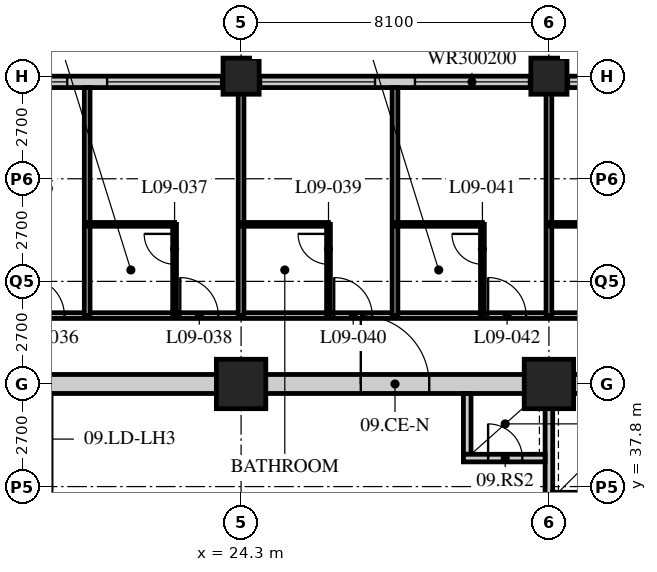
"""IFC4 building model, lengths in metres.
Left out: names, types, materials, properties, quantities, classifications, styles, units other than length and angle.
Written with IfcOpenShell. Run it as: python <this file> out.ifc"""

import sys

from ifc_helpers import new_model, si_unit, direction, frame, frame_2d, origin, origin_2d, place, context, subcontext, project, spatial, rectangle, hollow_rectangle, extrude, element, fill, save


model = new_model("IFC4")
c1 = context("Model", 3, precision=1e-05, world=origin(), true_north=direction((0.0, 1.0)))
c2 = subcontext(c1, "Body", "Model", "MODEL_VIEW")
j1 = project(units=[si_unit("LENGTHUNIT", "METRE"), si_unit("PLANEANGLEUNIT", "RADIAN")], contexts=[c1])
p1 = place(None, origin())
s1 = spatial("IfcSite", under=j1, at=p1, CompositionType="ELEMENT")
p2 = place(p1, origin())
s2 = spatial("IfcBuilding", under=s1, at=p2, CompositionType="ELEMENT")
p3 = place(p2, frame((0.0, 0.0, 43.2)))
s3 = spatial("IfcBuildingStorey", under=s2, at=p3, CompositionType="ELEMENT", Elevation=43.2)
p4 = place(p3, frame((24.3, 40.5, 0.0), z_axis=(0.0, 0.0, 1.0), x_axis=(1.0, 0.0, 0.0)))
e1 = element("IfcColumn", 1, at=p4, inside=s3, PredefinedType="COLUMN", context=c2, shape_type="SweptSolid", body=[
    extrude(hollow_rectangle(XDim=1.3, YDim=1.3, WallThickness=0.13, at=origin_2d()), origin(), (0.0, 0.0, 1.0), 3.4),
])
p5 = place(p3, frame((24.3, 48.6, 0.0), z_axis=(0.0, 0.0, 1.0), x_axis=(1.0, 0.0, 0.0)))
e2 = element("IfcColumn", 2, at=p5, inside=s3, PredefinedType="COLUMN", context=c2, shape_type="SweptSolid", body=[
    extrude(hollow_rectangle(XDim=0.95, YDim=0.95, WallThickness=0.095, at=origin_2d()), origin(), (0.0, 0.0, 1.0), 3.4),
])
p6 = place(p3, frame((32.4, 40.5, 0.0), z_axis=(0.0, 0.0, 1.0), x_axis=(1.0, 0.0, 0.0)))
e3 = element("IfcColumn", 3, at=p6, inside=s3, PredefinedType="COLUMN", context=c2, shape_type="SweptSolid", body=[
    extrude(hollow_rectangle(XDim=1.3, YDim=1.3, WallThickness=0.13, at=origin_2d()), origin(), (0.0, 0.0, 1.0), 3.4),
])
p7 = place(p3, frame((32.4, 48.6, 0.0), z_axis=(0.0, 0.0, 1.0), x_axis=(1.0, 0.0, 0.0)))
e4 = element("IfcColumn", 4, at=p7, inside=s3, PredefinedType="COLUMN", context=c2, shape_type="SweptSolid", body=[
    extrude(hollow_rectangle(XDim=0.95, YDim=0.95, WallThickness=0.095, at=origin_2d()), origin(), (0.0, 0.0, 1.0), 3.4),
])
p8 = place(p3, frame((48.3, 48.45, 0.0), z_axis=(0.0, 0.0, 1.0), x_axis=(-1.0, 0.0, 0.0)))
e5 = element("IfcWall", 5, at=p8, inside=s3, PredefinedType="SOLIDWALL", context=c2, shape_type="SweptSolid", body=[
    extrude(rectangle(XDim=40.2, YDim=0.3, at=frame_2d((20.1, 0.0))), origin(), (0.0, 0.0, 1.0), 3.19),
])
p9 = place(p8, frame((0.225, 0.0, 0.9)))
e6 = element("IfcOpeningElement", 6, at=p9, cuts=e5, PredefinedType="OPENING", context=c2, shape_type="SweptSolid", body=[
    extrude(rectangle(XDim=3.0, YDim=2.0, at=frame_2d((1.5, 1.0))), frame((0.0, 0.16, 0.0), z_axis=(0.0, -1.0, 0.0), x_axis=(1.0, 0.0, 0.0)), (0.0, 0.0, 1.0), 0.32),
])
p10 = place(p8, frame((4.275, 0.0, 0.9)))
e7 = element("IfcOpeningElement", 7, at=p10, cuts=e5, PredefinedType="OPENING", context=c2, shape_type="SweptSolid", body=[
    extrude(rectangle(XDim=3.0, YDim=2.0, at=frame_2d((1.5, 1.0))), frame((0.0, 0.16, 0.0), z_axis=(0.0, -1.0, 0.0), x_axis=(1.0, 0.0, 0.0)), (0.0, 0.0, 1.0), 0.32),
])
p11 = place(p8, frame((8.325, 0.0, 0.9)))
e8 = element("IfcOpeningElement", 8, at=p11, cuts=e5, PredefinedType="OPENING", context=c2, shape_type="SweptSolid", body=[
    extrude(rectangle(XDim=3.0, YDim=2.0, at=frame_2d((1.5, 1.0))), frame((0.0, 0.16, 0.0), z_axis=(0.0, -1.0, 0.0), x_axis=(1.0, 0.0, 0.0)), (0.0, 0.0, 1.0), 0.32),
])
p12 = place(p8, frame((12.375, 0.0, 0.9)))
e9 = element("IfcOpeningElement", 9, at=p12, cuts=e5, PredefinedType="OPENING", context=c2, shape_type="SweptSolid", body=[
    extrude(rectangle(XDim=3.0, YDim=2.0, at=frame_2d((1.5, 1.0))), frame((0.0, 0.16, 0.0), z_axis=(0.0, -1.0, 0.0), x_axis=(1.0, 0.0, 0.0)), (0.0, 0.0, 1.0), 0.32),
])
p13 = place(p8, frame((16.425, 0.0, 0.9)))
e10 = element("IfcOpeningElement", 10, at=p13, cuts=e5, PredefinedType="OPENING", context=c2, shape_type="SweptSolid", body=[
    extrude(rectangle(XDim=3.0, YDim=2.0, at=frame_2d((1.5, 1.0))), frame((0.0, 0.16, 0.0), z_axis=(0.0, -1.0, 0.0), x_axis=(1.0, 0.0, 0.0)), (0.0, 0.0, 1.0), 0.32),
])
p14 = place(p8, frame((20.475, 0.0, 0.9)))
e11 = element("IfcOpeningElement", 11, at=p14, cuts=e5, PredefinedType="OPENING", context=c2, shape_type="SweptSolid", body=[
    extrude(rectangle(XDim=3.0, YDim=2.0, at=frame_2d((1.5, 1.0))), frame((0.0, 0.16, 0.0), z_axis=(0.0, -1.0, 0.0), x_axis=(1.0, 0.0, 0.0)), (0.0, 0.0, 1.0), 0.32),
])
p15 = place(p8, frame((24.525, 0.0, 0.9)))
e12 = element("IfcOpeningElement", 12, at=p15, cuts=e5, PredefinedType="OPENING", context=c2, shape_type="SweptSolid", body=[
    extrude(rectangle(XDim=3.0, YDim=2.0, at=frame_2d((1.5, 1.0))), frame((0.0, 0.16, 0.0), z_axis=(0.0, -1.0, 0.0), x_axis=(1.0, 0.0, 0.0)), (0.0, 0.0, 1.0), 0.32),
])
p16 = place(p8, frame((28.575, 0.0, 0.9)))
e13 = element("IfcOpeningElement", 13, at=p16, cuts=e5, PredefinedType="OPENING", context=c2, shape_type="SweptSolid", body=[
    extrude(rectangle(XDim=3.0, YDim=2.0, at=frame_2d((1.5, 1.0))), frame((0.0, 0.16, 0.0), z_axis=(0.0, -1.0, 0.0), x_axis=(1.0, 0.0, 0.0)), (0.0, 0.0, 1.0), 0.32),
])
p17 = place(p8, frame((32.625, 0.0, 0.9)))
e14 = element("IfcOpeningElement", 14, at=p17, cuts=e5, PredefinedType="OPENING", context=c2, shape_type="SweptSolid", body=[
    extrude(rectangle(XDim=3.0, YDim=2.0, at=frame_2d((1.5, 1.0))), frame((0.0, 0.16, 0.0), z_axis=(0.0, -1.0, 0.0), x_axis=(1.0, 0.0, 0.0)), (0.0, 0.0, 1.0), 0.32),
])
p18 = place(p8, frame((36.675, 0.0, 0.9)))
e15 = element("IfcOpeningElement", 15, at=p18, cuts=e5, PredefinedType="OPENING", context=c2, shape_type="SweptSolid", body=[
    extrude(rectangle(XDim=3.0, YDim=2.0, at=frame_2d((1.5, 1.0))), frame((0.0, 0.16, 0.0), z_axis=(0.0, -1.0, 0.0), x_axis=(1.0, 0.0, 0.0)), (0.0, 0.0, 1.0), 0.32),
])
p19 = place(p3, frame((8.1, 42.3, 0.0), z_axis=(0.0, 0.0, 1.0), x_axis=(1.0, 0.0, 0.0)))
e16 = element("IfcWall", 16, at=p19, inside=s3, PredefinedType="PARTITIONING", context=c2, shape_type="SweptSolid", body=[
    extrude(rectangle(XDim=40.5, YDim=0.15, at=frame_2d((20.25, 0.0))), origin(), (0.0, 0.0, 1.0), 3.19),
])
p20 = place(p19, frame((6.5, 0.0, 0.0)))
e17 = element("IfcOpeningElement", 17, at=p20, cuts=e16, PredefinedType="OPENING", context=c2, shape_type="SweptSolid", body=[
    extrude(rectangle(XDim=1.0, YDim=2.1, at=frame_2d((0.5, 1.05))), frame((0.0, 0.085, 0.0), z_axis=(0.0, -1.0, 0.0), x_axis=(1.0, 0.0, 0.0)), (0.0, 0.0, 1.0), 0.17),
])
p21 = place(p19, frame((10.55, 0.0, 0.0)))
e18 = element("IfcOpeningElement", 18, at=p21, cuts=e16, PredefinedType="OPENING", context=c2, shape_type="SweptSolid", body=[
    extrude(rectangle(XDim=1.0, YDim=2.1, at=frame_2d((0.5, 1.05))), frame((0.0, 0.085, 0.0), z_axis=(0.0, -1.0, 0.0), x_axis=(1.0, 0.0, 0.0)), (0.0, 0.0, 1.0), 0.17),
])
p22 = place(p19, frame((14.6, 0.0, 0.0)))
e19 = element("IfcOpeningElement", 19, at=p22, cuts=e16, PredefinedType="OPENING", context=c2, shape_type="SweptSolid", body=[
    extrude(rectangle(XDim=1.0, YDim=2.1, at=frame_2d((0.5, 1.05))), frame((0.0, 0.085, 0.0), z_axis=(0.0, -1.0, 0.0), x_axis=(1.0, 0.0, 0.0)), (0.0, 0.0, 1.0), 0.17),
])
p23 = place(p19, frame((18.65, 0.0, 0.0)))
e20 = element("IfcOpeningElement", 20, at=p23, cuts=e16, PredefinedType="OPENING", context=c2, shape_type="SweptSolid", body=[
    extrude(rectangle(XDim=1.0, YDim=2.1, at=frame_2d((0.5, 1.05))), frame((0.0, 0.085, 0.0), z_axis=(0.0, -1.0, 0.0), x_axis=(1.0, 0.0, 0.0)), (0.0, 0.0, 1.0), 0.17),
])
p24 = place(p19, frame((22.7, 0.0, 0.0)))
e21 = element("IfcOpeningElement", 21, at=p24, cuts=e16, PredefinedType="OPENING", context=c2, shape_type="SweptSolid", body=[
    extrude(rectangle(XDim=1.0, YDim=2.1, at=frame_2d((0.5, 1.05))), frame((0.0, 0.085, 0.0), z_axis=(0.0, -1.0, 0.0), x_axis=(1.0, 0.0, 0.0)), (0.0, 0.0, 1.0), 0.17),
])
p25 = place(p19, frame((26.75, 0.0, 0.0)))
e22 = element("IfcOpeningElement", 22, at=p25, cuts=e16, PredefinedType="OPENING", context=c2, shape_type="SweptSolid", body=[
    extrude(rectangle(XDim=1.0, YDim=2.1, at=frame_2d((0.5, 1.05))), frame((0.0, 0.085, 0.0), z_axis=(0.0, -1.0, 0.0), x_axis=(1.0, 0.0, 0.0)), (0.0, 0.0, 1.0), 0.17),
])
p26 = place(p19, frame((30.8, 0.0, 0.0)))
e23 = element("IfcOpeningElement", 23, at=p26, cuts=e16, PredefinedType="OPENING", context=c2, shape_type="SweptSolid", body=[
    extrude(rectangle(XDim=1.0, YDim=2.1, at=frame_2d((0.5, 1.05))), frame((0.0, 0.085, 0.0), z_axis=(0.0, -1.0, 0.0), x_axis=(1.0, 0.0, 0.0)), (0.0, 0.0, 1.0), 0.17),
])
p27 = place(p19, frame((34.85, 0.0, 0.0)))
e24 = element("IfcOpeningElement", 24, at=p27, cuts=e16, PredefinedType="OPENING", context=c2, shape_type="SweptSolid", body=[
    extrude(rectangle(XDim=1.0, YDim=2.1, at=frame_2d((0.5, 1.05))), frame((0.0, 0.085, 0.0), z_axis=(0.0, -1.0, 0.0), x_axis=(1.0, 0.0, 0.0)), (0.0, 0.0, 1.0), 0.17),
])
p28 = place(p19, frame((36.875, 0.0, 0.0)))
e25 = element("IfcOpeningElement", 25, at=p28, cuts=e16, PredefinedType="OPENING", context=c2, shape_type="SweptSolid", body=[
    extrude(rectangle(XDim=1.0, YDim=2.1, at=frame_2d((0.5, 1.05))), frame((0.0, 0.085, 0.0), z_axis=(0.0, -1.0, 0.0), x_axis=(1.0, 0.0, 0.0)), (0.0, 0.0, 1.0), 0.17),
])
p29 = place(p19, frame((2.625, 0.0, 0.0)))
e26 = element("IfcOpeningElement", 26, at=p29, cuts=e16, PredefinedType="OPENING", context=c2, shape_type="SweptSolid", body=[
    extrude(rectangle(XDim=1.0, YDim=2.1, at=frame_2d((0.5, 1.05))), frame((0.0, 0.085, 0.0), z_axis=(0.0, -1.0, 0.0), x_axis=(1.0, 0.0, 0.0)), (0.0, 0.0, 1.0), 0.17),
])
p30 = place(p3, frame((20.25, 42.3, 0.0), z_axis=(0.0, 0.0, 1.0), x_axis=(0.0, 1.0, 0.0)))
e27 = element("IfcWall", 27, at=p30, inside=s3, PredefinedType="PARTITIONING", context=c2, shape_type="SweptSolid", body=[
    extrude(rectangle(XDim=6.0, YDim=0.15, at=frame_2d((3.0, 0.0))), origin(), (0.0, 0.0, 1.0), 3.19),
])
p31 = place(p3, frame((20.25, 44.7, 0.0), z_axis=(0.0, 0.0, 1.0), x_axis=(1.0, 0.0, 0.0)))
e28 = element("IfcWall", 28, at=p31, inside=s3, PredefinedType="PARTITIONING", context=c2, shape_type="SweptSolid", body=[
    extrude(rectangle(XDim=2.3, YDim=0.1, at=frame_2d((1.15, 0.0))), origin(), (0.0, 0.0, 1.0), 3.19),
])
p32 = place(p3, frame((22.55, 42.3, 0.0), z_axis=(0.0, 0.0, 1.0), x_axis=(0.0, 1.0, 0.0)))
e29 = element("IfcWall", 29, at=p32, inside=s3, PredefinedType="PARTITIONING", context=c2, shape_type="SweptSolid", body=[
    extrude(rectangle(XDim=2.4, YDim=0.1, at=frame_2d((1.2, 0.0))), origin(), (0.0, 0.0, 1.0), 3.19),
])
p33 = place(p32, frame((1.35, 0.0, 0.0)))
e30 = element("IfcOpeningElement", 30, at=p33, cuts=e29, PredefinedType="OPENING", context=c2, shape_type="SweptSolid", body=[
    extrude(rectangle(XDim=0.8, YDim=2.1, at=frame_2d((0.4, 1.05))), frame((0.0, 0.06, 0.0), z_axis=(0.0, -1.0, 0.0), x_axis=(1.0, 0.0, 0.0)), (0.0, 0.0, 1.0), 0.12),
])
p34 = place(p3, frame((24.3, 42.3, 0.0), z_axis=(0.0, 0.0, 1.0), x_axis=(0.0, 1.0, 0.0)))
e31 = element("IfcWall", 31, at=p34, inside=s3, PredefinedType="PARTITIONING", context=c2, shape_type="SweptSolid", body=[
    extrude(rectangle(XDim=6.0, YDim=0.15, at=frame_2d((3.0, 0.0))), origin(), (0.0, 0.0, 1.0), 2.578),
])
p35 = place(p3, frame((24.3, 44.7, 0.0), z_axis=(0.0, 0.0, 1.0), x_axis=(1.0, 0.0, 0.0)))
e32 = element("IfcWall", 32, at=p35, inside=s3, PredefinedType="PARTITIONING", context=c2, shape_type="SweptSolid", body=[
    extrude(rectangle(XDim=2.3, YDim=0.1, at=frame_2d((1.15, 0.0))), origin(), (0.0, 0.0, 1.0), 3.19),
])
p36 = place(p3, frame((26.6, 42.3, 0.0), z_axis=(0.0, 0.0, 1.0), x_axis=(0.0, 1.0, 0.0)))
e33 = element("IfcWall", 33, at=p36, inside=s3, PredefinedType="PARTITIONING", context=c2, shape_type="SweptSolid", body=[
    extrude(rectangle(XDim=2.4, YDim=0.1, at=frame_2d((1.2, 0.0))), origin(), (0.0, 0.0, 1.0), 3.19),
])
p37 = place(p36, frame((1.35, 0.0, 0.0)))
e34 = element("IfcOpeningElement", 34, at=p37, cuts=e33, PredefinedType="OPENING", context=c2, shape_type="SweptSolid", body=[
    extrude(rectangle(XDim=0.8, YDim=2.1, at=frame_2d((0.4, 1.05))), frame((0.0, 0.06, 0.0), z_axis=(0.0, -1.0, 0.0), x_axis=(1.0, 0.0, 0.0)), (0.0, 0.0, 1.0), 0.12),
])
p38 = place(p3, frame((28.35, 42.3, 0.0), z_axis=(0.0, 0.0, 1.0), x_axis=(0.0, 1.0, 0.0)))
e35 = element("IfcWall", 35, at=p38, inside=s3, PredefinedType="PARTITIONING", context=c2, shape_type="SweptSolid", body=[
    extrude(rectangle(XDim=6.0, YDim=0.15, at=frame_2d((3.0, 0.0))), origin(), (0.0, 0.0, 1.0), 3.19),
])
p39 = place(p3, frame((28.35, 44.7, 0.0), z_axis=(0.0, 0.0, 1.0), x_axis=(1.0, 0.0, 0.0)))
e36 = element("IfcWall", 36, at=p39, inside=s3, PredefinedType="PARTITIONING", context=c2, shape_type="SweptSolid", body=[
    extrude(rectangle(XDim=2.3, YDim=0.1, at=frame_2d((1.15, 0.0))), origin(), (0.0, 0.0, 1.0), 3.19),
])
p40 = place(p3, frame((30.65, 42.3, 0.0), z_axis=(0.0, 0.0, 1.0), x_axis=(0.0, 1.0, 0.0)))
e37 = element("IfcWall", 37, at=p40, inside=s3, PredefinedType="PARTITIONING", context=c2, shape_type="SweptSolid", body=[
    extrude(rectangle(XDim=2.4, YDim=0.1, at=frame_2d((1.2, 0.0))), origin(), (0.0, 0.0, 1.0), 3.19),
])
p41 = place(p40, frame((1.35, 0.0, 0.0)))
e38 = element("IfcOpeningElement", 38, at=p41, cuts=e37, PredefinedType="OPENING", context=c2, shape_type="SweptSolid", body=[
    extrude(rectangle(XDim=0.8, YDim=2.1, at=frame_2d((0.4, 1.05))), frame((0.0, 0.06, 0.0), z_axis=(0.0, -1.0, 0.0), x_axis=(1.0, 0.0, 0.0)), (0.0, 0.0, 1.0), 0.12),
])
p42 = place(p3, frame((32.4, 42.3, 0.0), z_axis=(0.0, 0.0, 1.0), x_axis=(0.0, 1.0, 0.0)))
e39 = element("IfcWall", 39, at=p42, inside=s3, PredefinedType="PARTITIONING", context=c2, shape_type="SweptSolid", body=[
    extrude(rectangle(XDim=6.0, YDim=0.15, at=frame_2d((3.0, 0.0))), origin(), (0.0, 0.0, 1.0), 2.578),
])
p43 = place(p3, frame((32.4, 44.7, 0.0), z_axis=(0.0, 0.0, 1.0), x_axis=(1.0, 0.0, 0.0)))
e40 = element("IfcWall", 40, at=p43, inside=s3, PredefinedType="PARTITIONING", context=c2, shape_type="SweptSolid", body=[
    extrude(rectangle(XDim=2.3, YDim=0.1, at=frame_2d((1.15, 0.0))), origin(), (0.0, 0.0, 1.0), 3.19),
])
p44 = place(p3, frame((15.95, 40.5, 0.0), z_axis=(0.0, 0.0, 1.0), x_axis=(1.0, 0.0, 0.0)))
e41 = element("IfcWall", 41, at=p44, inside=s3, PredefinedType="SOLIDWALL", context=c2, shape_type="SweptSolid", body=[
    extrude(rectangle(XDim=24.8, YDim=0.5, at=frame_2d((12.4, 0.0))), origin(), (0.0, 0.0, 1.0), 2.54),
])
p45 = place(p44, frame((11.5, 0.0, 0.0)))
e42 = element("IfcOpeningElement", 42, at=p45, cuts=e41, PredefinedType="OPENING", context=c2, shape_type="SweptSolid", body=[
    extrude(rectangle(XDim=1.8, YDim=2.4, at=frame_2d((0.9, 1.2))), frame((0.0, 0.26, 0.0), z_axis=(0.0, -1.0, 0.0), x_axis=(1.0, 0.0, 0.0)), (0.0, 0.0, 1.0), 0.52),
])
p46 = place(p3, frame((32.4, 32.5, 0.0), z_axis=(0.0, 0.0, 1.0), x_axis=(0.0, 1.0, 0.0)))
e43 = element("IfcWall", 43, at=p46, inside=s3, PredefinedType="SOLIDWALL", context=c2, shape_type="SweptSolid", body=[
    extrude(rectangle(XDim=7.75, YDim=0.2, at=frame_2d((3.875, 0.0))), origin(), (0.0, 0.0, 1.0), 2.578),
])
p47 = place(p46, frame((1.9, 0.0, 0.0)))
e44 = element("IfcOpeningElement", 44, at=p47, cuts=e43, PredefinedType="OPENING", context=c2, shape_type="SweptSolid", body=[
    extrude(rectangle(XDim=1.2, YDim=2.1, at=frame_2d((0.6, 1.05))), frame((0.0, 0.11, 0.0), z_axis=(0.0, -1.0, 0.0), x_axis=(1.0, 0.0, 0.0)), (0.0, 0.0, 1.0), 0.22),
])
p48 = place(p3, frame((30.25, 38.65, 0.0), z_axis=(0.0, 0.0, 1.0), x_axis=(0.0, 1.0, 0.0)))
e45 = element("IfcWall", 45, at=p48, inside=s3, PredefinedType="SOLIDWALL", context=c2, shape_type="SweptSolid", body=[
    extrude(rectangle(XDim=1.6, YDim=0.2, at=frame_2d((0.8, 0.0))), origin(), (0.0, 0.0, 1.0), 3.19),
])
p49 = place(p3, frame((30.15, 38.55, 0.0), z_axis=(0.0, 0.0, 1.0), x_axis=(1.0, 0.0, 0.0)))
e46 = element("IfcWall", 46, at=p49, inside=s3, PredefinedType="SOLIDWALL", context=c2, shape_type="SweptSolid", body=[
    extrude(rectangle(XDim=2.15, YDim=0.2, at=frame_2d((1.075, 0.0))), origin(), (0.0, 0.0, 1.0), 3.19),
])
p50 = place(p49, frame((0.65, 0.0, 0.0)))
e47 = element("IfcOpeningElement", 47, at=p50, cuts=e46, PredefinedType="OPENING", context=c2, shape_type="SweptSolid", body=[
    extrude(rectangle(XDim=0.9, YDim=2.1, at=frame_2d((0.45, 1.05))), frame((0.0, 0.11, 0.0), z_axis=(0.0, -1.0, 0.0), x_axis=(1.0, 0.0, 0.0)), (0.0, 0.0, 1.0), 0.22),
])
p51 = place(p12, origin())
e48 = element("IfcWindow", 48, at=p51, inside=s3, PartitioningType="SINGLE_PANEL", PredefinedType="WINDOW", context=c2, shape_type="SweptSolid", body=[
    extrude(rectangle(XDim=3.0, YDim=2.0, at=frame_2d((1.5, 1.0))), frame((0.0, 0.03, 0.0), z_axis=(0.0, -1.0, 0.0), x_axis=(1.0, 0.0, 0.0)), (0.0, 0.0, 1.0), 0.06),
])
fill(e9, e48)
p52 = place(p13, origin())
e49 = element("IfcWindow", 49, at=p52, inside=s3, PartitioningType="SINGLE_PANEL", PredefinedType="WINDOW", context=c2, shape_type="SweptSolid", body=[
    extrude(rectangle(XDim=3.0, YDim=2.0, at=frame_2d((1.5, 1.0))), frame((0.0, 0.03, 0.0), z_axis=(0.0, -1.0, 0.0), x_axis=(1.0, 0.0, 0.0)), (0.0, 0.0, 1.0), 0.06),
])
fill(e10, e49)
p53 = place(p14, origin())
e50 = element("IfcWindow", 50, at=p53, inside=s3, PartitioningType="SINGLE_PANEL", PredefinedType="WINDOW", context=c2, shape_type="SweptSolid", body=[
    extrude(rectangle(XDim=3.0, YDim=2.0, at=frame_2d((1.5, 1.0))), frame((0.0, 0.03, 0.0), z_axis=(0.0, -1.0, 0.0), x_axis=(1.0, 0.0, 0.0)), (0.0, 0.0, 1.0), 0.06),
])
fill(e11, e50)
p54 = place(p15, origin())
e51 = element("IfcWindow", 51, at=p54, inside=s3, PartitioningType="SINGLE_PANEL", PredefinedType="WINDOW", context=c2, shape_type="SweptSolid", body=[
    extrude(rectangle(XDim=3.0, YDim=2.0, at=frame_2d((1.5, 1.0))), frame((0.0, 0.03, 0.0), z_axis=(0.0, -1.0, 0.0), x_axis=(1.0, 0.0, 0.0)), (0.0, 0.0, 1.0), 0.06),
])
fill(e12, e51)
p55 = place(p16, origin())
e52 = element("IfcWindow", 52, at=p55, inside=s3, PartitioningType="SINGLE_PANEL", PredefinedType="WINDOW", context=c2, shape_type="SweptSolid", body=[
    extrude(rectangle(XDim=3.0, YDim=2.0, at=frame_2d((1.5, 1.0))), frame((0.0, 0.03, 0.0), z_axis=(0.0, -1.0, 0.0), x_axis=(1.0, 0.0, 0.0)), (0.0, 0.0, 1.0), 0.06),
])
fill(e13, e52)
p56 = place(p21, origin())
e53 = element("IfcDoor", 53, at=p56, inside=s3, OperationType="SINGLE_SWING_LEFT", PredefinedType="DOOR", context=c2, shape_type="SweptSolid", body=[
    extrude(rectangle(XDim=1.0, YDim=2.1, at=frame_2d((0.5, 1.05))), frame((0.0, 0.025, 0.0), z_axis=(0.0, -1.0, 0.0), x_axis=(1.0, 0.0, 0.0)), (0.0, 0.0, 1.0), 0.05),
])
fill(e18, e53)
p57 = place(p33, origin())
e54 = element("IfcDoor", 54, at=p57, inside=s3, OperationType="SINGLE_SWING_RIGHT", PredefinedType="DOOR", context=c2, shape_type="SweptSolid", body=[
    extrude(rectangle(XDim=0.8, YDim=2.1, at=frame_2d((0.4, 1.05))), frame((0.0, 0.025, 0.0), z_axis=(0.0, -1.0, 0.0), x_axis=(1.0, 0.0, 0.0)), (0.0, 0.0, 1.0), 0.05),
])
fill(e30, e54)
p58 = place(p22, origin())
e55 = element("IfcDoor", 55, at=p58, inside=s3, OperationType="SINGLE_SWING_LEFT", PredefinedType="DOOR", context=c2, shape_type="SweptSolid", body=[
    extrude(rectangle(XDim=1.0, YDim=2.1, at=frame_2d((0.5, 1.05))), frame((0.0, 0.025, 0.0), z_axis=(0.0, -1.0, 0.0), x_axis=(1.0, 0.0, 0.0)), (0.0, 0.0, 1.0), 0.05),
])
fill(e19, e55)
p59 = place(p37, origin())
e56 = element("IfcDoor", 56, at=p59, inside=s3, OperationType="SINGLE_SWING_RIGHT", PredefinedType="DOOR", context=c2, shape_type="SweptSolid", body=[
    extrude(rectangle(XDim=0.8, YDim=2.1, at=frame_2d((0.4, 1.05))), frame((0.0, 0.025, 0.0), z_axis=(0.0, -1.0, 0.0), x_axis=(1.0, 0.0, 0.0)), (0.0, 0.0, 1.0), 0.05),
])
fill(e34, e56)
p60 = place(p23, origin())
e57 = element("IfcDoor", 57, at=p60, inside=s3, OperationType="SINGLE_SWING_LEFT", PredefinedType="DOOR", context=c2, shape_type="SweptSolid", body=[
    extrude(rectangle(XDim=1.0, YDim=2.1, at=frame_2d((0.5, 1.05))), frame((0.0, 0.025, 0.0), z_axis=(0.0, -1.0, 0.0), x_axis=(1.0, 0.0, 0.0)), (0.0, 0.0, 1.0), 0.05),
])
fill(e20, e57)
p61 = place(p41, origin())
e58 = element("IfcDoor", 58, at=p61, inside=s3, OperationType="SINGLE_SWING_RIGHT", PredefinedType="DOOR", context=c2, shape_type="SweptSolid", body=[
    extrude(rectangle(XDim=0.8, YDim=2.1, at=frame_2d((0.4, 1.05))), frame((0.0, 0.025, 0.0), z_axis=(0.0, -1.0, 0.0), x_axis=(1.0, 0.0, 0.0)), (0.0, 0.0, 1.0), 0.05),
])
fill(e38, e58)
p62 = place(p24, origin())
e59 = element("IfcDoor", 59, at=p62, inside=s3, OperationType="SINGLE_SWING_LEFT", PredefinedType="DOOR", context=c2, shape_type="SweptSolid", body=[
    extrude(rectangle(XDim=1.0, YDim=2.1, at=frame_2d((0.5, 1.05))), frame((0.0, 0.025, 0.0), z_axis=(0.0, -1.0, 0.0), x_axis=(1.0, 0.0, 0.0)), (0.0, 0.0, 1.0), 0.05),
])
fill(e21, e59)
p63 = place(p50, origin())
e60 = element("IfcDoor", 60, at=p63, inside=s3, OperationType="SINGLE_SWING_LEFT", PredefinedType="DOOR", context=c2, shape_type="SweptSolid", body=[
    extrude(rectangle(XDim=0.9, YDim=2.1, at=frame_2d((0.45, 1.05))), frame((0.0, 0.025, 0.0), z_axis=(0.0, -1.0, 0.0), x_axis=(1.0, 0.0, 0.0)), (0.0, 0.0, 1.0), 0.05),
])
fill(e47, e60)
p64 = place(p45, origin())
e61 = element("IfcDoor", 61, at=p64, inside=s3, OperationType="DOUBLE_DOOR_SINGLE_SWING", PredefinedType="DOOR", context=c2, shape_type="SweptSolid", body=[
    extrude(rectangle(XDim=1.8, YDim=2.4, at=frame_2d((0.9, 1.2))), frame((0.0, 0.025, 0.0), z_axis=(0.0, -1.0, 0.0), x_axis=(1.0, 0.0, 0.0)), (0.0, 0.0, 1.0), 0.05),
])
fill(e42, e61)
save(model, sys.argv[1])
